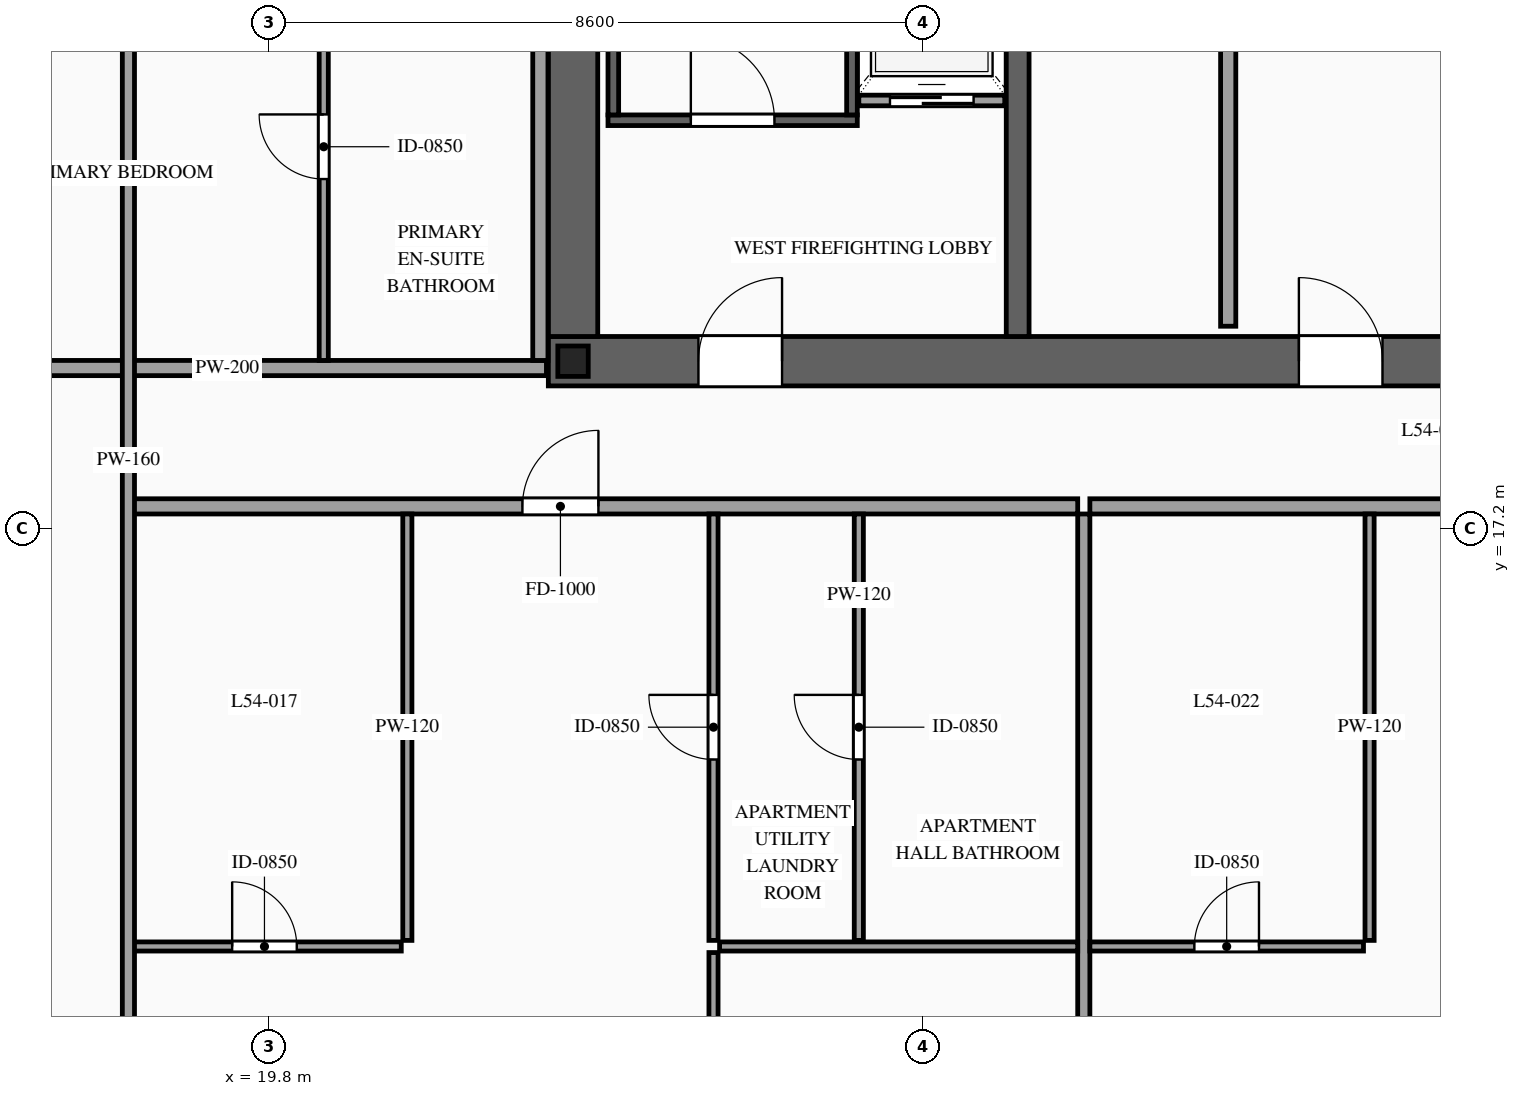
"""IFC4 building model, lengths in metres.
Left out: names, types, materials, properties, quantities, classifications, styles, units other than length and angle.
Written with IfcOpenShell. Run it as: python <this file> out.ifc"""

import sys

from ifc_helpers import new_model, si_unit, direction, frame, frame_2d, origin, origin_2d, place, context, subcontext, project, spatial, rectangle, i_section, extrude, source, transform, mapped, element, fill, save


model = new_model("IFC4")
c1 = context("Model", 3, precision=1e-05, world=origin(), true_north=direction((0.0, 1.0)))
c2 = subcontext(c1, "Body", "Model", "MODEL_VIEW")
j1 = project(units=[si_unit("LENGTHUNIT", "METRE"), si_unit("PLANEANGLEUNIT", "RADIAN")], contexts=[c1])
p1 = place(None, origin())
s1 = spatial("IfcSite", under=j1, at=p1, CompositionType="ELEMENT")
p2 = place(p1, origin())
s2 = spatial("IfcBuilding", under=s1, at=p2, CompositionType="ELEMENT")
p3 = place(p2, frame((0.0, 0.0, 205.5)))
s3 = spatial("IfcBuildingStorey", under=s2, at=p3, CompositionType="ELEMENT", Elevation=205.5)
p4 = place(p3, frame((23.475, 19.4, 0.0), z_axis=(0.0, 0.0, 1.0), x_axis=(1.0, 0.0, 0.0)))
e1 = element("IfcWall", 1, at=p4, inside=s3, PredefinedType="SHEAR", context=c2, shape_type="SweptSolid", body=[
    extrude(rectangle(XDim=27.05, YDim=0.65, at=frame_2d((13.525, 0.0))), origin(), (0.0, 0.0, 1.0), 3.5),
])
p5 = place(p4, frame((1.975, 0.0, 0.0)))
e2 = element("IfcOpeningElement", 2, at=p5, cuts=e1, PredefinedType="OPENING", context=c2, shape_type="SweptSolid", body=[
    extrude(rectangle(XDim=1.1, YDim=2.2, at=frame_2d((0.55, 1.1))), frame((0.0, 0.34, 0.0), z_axis=(0.0, -1.0, 0.0), x_axis=(1.0, 0.0, 0.0)), (0.0, 0.0, 1.0), 0.68),
])
p6 = place(p4, frame((9.875, 0.0, 0.0)))
e3 = element("IfcOpeningElement", 3, at=p6, cuts=e1, PredefinedType="OPENING", context=c2, shape_type="SweptSolid", body=[
    extrude(rectangle(XDim=1.1, YDim=2.2, at=frame_2d((0.55, 1.1))), frame((0.0, 0.34, 0.0), z_axis=(0.0, -1.0, 0.0), x_axis=(1.0, 0.0, 0.0)), (0.0, 0.0, 1.0), 0.68),
])
p7 = place(p4, frame((23.075, 0.0, 0.0)))
e4 = element("IfcOpeningElement", 4, at=p7, cuts=e1, PredefinedType="OPENING", context=c2, shape_type="SweptSolid", body=[
    extrude(rectangle(XDim=1.1, YDim=2.2, at=frame_2d((0.55, 1.1))), frame((0.0, 0.34, 0.0), z_axis=(0.0, -1.0, 0.0), x_axis=(1.0, 0.0, 0.0)), (0.0, 0.0, 1.0), 0.68),
])
p8 = place(p4, frame((19.695, 0.0, 0.0)))
e5 = element("IfcOpeningElement", 5, at=p8, cuts=e1, PredefinedType="OPENING", context=c2, shape_type="SweptSolid", body=[
    extrude(rectangle(XDim=0.9, YDim=2.15, at=frame_2d((0.45, 1.075))), frame((0.0, 0.34, 0.0), z_axis=(0.0, -1.0, 0.0), x_axis=(1.0, 0.0, 0.0)), (0.0, 0.0, 1.0), 0.68),
])
p9 = place(p4, frame((18.255, 0.0, 0.0)))
e6 = element("IfcOpeningElement", 6, at=p9, cuts=e1, PredefinedType="OPENING", context=c2, shape_type="SweptSolid", body=[
    extrude(rectangle(XDim=0.9, YDim=2.15, at=frame_2d((0.45, 1.075))), frame((0.0, 0.34, 0.0), z_axis=(0.0, -1.0, 0.0), x_axis=(1.0, 0.0, 0.0)), (0.0, 0.0, 1.0), 0.68),
])
m1 = source(origin(), c2, "Body", "SweptSolid", [
    extrude(rectangle(XDim=12.15, YDim=0.65, at=frame_2d((6.075, 0.0))), origin(), (0.0, 0.0, 1.0), 3.5),
])
p10 = place(p3, frame((23.8, 19.725, 0.0), z_axis=(0.0, 0.0, 1.0), x_axis=(0.0, 1.0, 0.0)))
e7 = element("IfcWall", 7, at=p10, inside=s3, PredefinedType="SHEAR", context=c2, shape_type="MappedRepresentation", body=[
    mapped(m1, transform((0.0, 0.0, 0.0), scale=1.0)),
])
m2 = source(origin(), c2, "Body", "SweptSolid", [
    extrude(rectangle(XDim=12.15, YDim=0.3, at=frame_2d((6.075, 0.0))), origin(), (0.0, 0.0, 1.0), 3.5),
])
p11 = place(p3, frame((29.65, 19.725, 0.0), z_axis=(0.0, 0.0, 1.0), x_axis=(0.0, 1.0, 0.0)))
e8 = element("IfcWall", 8, at=p11, inside=s3, PredefinedType="SOLIDWALL", context=c2, shape_type="MappedRepresentation", body=[
    mapped(m2, transform((0.0, 0.0, 0.0), scale=1.0)),
])
m3 = source(origin(), c2, "Body", "SweptSolid", [
    extrude(i_section(OverallWidth=0.4, OverallDepth=0.4, WebThickness=0.013, FlangeThickness=0.021, at=origin_2d()), origin(), (0.0, 0.0, 1.0), 3.5),
])
p12 = place(p3, frame((23.8, 19.4, 0.0), z_axis=(0.0, 0.0, 1.0), x_axis=(1.0, 0.0, 0.0)))
e9 = element("IfcColumn", 9, at=p12, inside=s3, PredefinedType="COLUMN", context=c2, shape_type="MappedRepresentation", body=[
    mapped(m3, transform((0.0, 0.0, 0.0), scale=1.0)),
])
p13 = place(p3, frame((27.56, 22.83, 0.0), z_axis=(0.0, 0.0, 1.0), x_axis=(1.0, 0.0, 0.0)))
e10 = element("IfcWall", 10, at=p13, inside=s3, PredefinedType="SOLIDWALL", context=c2, shape_type="SweptSolid", body=[
    extrude(rectangle(XDim=1.92, YDim=0.14, at=frame_2d((0.96, 0.0))), origin(), (0.0, 0.0, 1.0), 3.28),
])
p14 = place(p13, frame((0.41, 0.0, 0.0)))
e11 = element("IfcOpeningElement", 11, at=p14, cuts=e10, PredefinedType="OPENING", context=c2, shape_type="SweptSolid", body=[
    extrude(rectangle(XDim=1.1, YDim=2.2, at=frame_2d((0.55, 1.1))), frame((0.0, 0.085, 0.0), z_axis=(0.0, -1.0, 0.0), x_axis=(1.0, 0.0, 0.0)), (0.0, 0.0, 1.0), 0.17),
])
p15 = place(p3, frame((24.26, 22.57, 0.0), z_axis=(0.0, 0.0, 1.0), x_axis=(1.0, 0.0, 0.0)))
e12 = element("IfcWall", 12, at=p15, inside=s3, PredefinedType="SOLIDWALL", context=c2, shape_type="SweptSolid", body=[
    extrude(rectangle(XDim=3.28, YDim=0.14, at=frame_2d((1.64, 0.0))), origin(), (0.0, 0.0, 1.0), 3.28),
])
p16 = place(p15, frame((1.09, 0.0, 0.0)))
e13 = element("IfcOpeningElement", 13, at=p16, cuts=e12, PredefinedType="OPENING", context=c2, shape_type="SweptSolid", body=[
    extrude(rectangle(XDim=1.1, YDim=2.2, at=frame_2d((0.55, 1.1))), frame((0.0, 0.085, 0.0), z_axis=(0.0, -1.0, 0.0), x_axis=(1.0, 0.0, 0.0)), (0.0, 0.0, 1.0), 0.17),
])
m4 = source(origin(), c2, "Body", "SweptSolid", [
    extrude(rectangle(XDim=8.94, YDim=0.14, at=frame_2d((4.47, 0.0))), origin(), (0.0, 0.0, 1.0), 3.28),
])
for number, where, z_axis, x_axis in (
    (14, (24.33, 22.64, 0.0), (0.0, 0.0, 1.0), (0.0, 1.0, 0.0)),
    (15, (27.47, 22.64, 0.0), (0.0, 0.0, 1.0), (0.0, 1.0, 0.0)),
):
    element("IfcWall", number, at=place(p3, frame(where, z_axis=z_axis, x_axis=x_axis)), inside=s3, PredefinedType="SOLIDWALL", context=c2, shape_type="MappedRepresentation", body=[
        mapped(m4, transform((0.0, 0.0, 0.0), scale=1.0)),
    ])
p17 = place(p3, frame((32.42, 19.86, 0.0), z_axis=(0.0, 0.0, 1.0), x_axis=(0.0, 1.0, 0.0)))
e16 = element("IfcWall", 16, at=p17, inside=s3, PredefinedType="PARTITIONING", context=c2, shape_type="SweptSolid", body=[
    extrude(rectangle(XDim=11.88, YDim=0.2, at=frame_2d((5.94, 0.0))), origin(), (0.0, 0.0, 1.0), 3.28),
])
p18 = place(p17, frame((5.49, 0.0, 0.0)))
e17 = element("IfcOpeningElement", 17, at=p18, cuts=e16, PredefinedType="OPENING", context=c2, shape_type="SweptSolid", body=[
    extrude(rectangle(XDim=0.9, YDim=2.15, at=frame_2d((0.45, 1.075))), frame((0.0, 0.115, 0.0), z_axis=(0.0, -1.0, 0.0), x_axis=(1.0, 0.0, 0.0)), (0.0, 0.0, 1.0), 0.23),
])
p19 = place(p3, frame((17.94, 17.49, 0.0), z_axis=(0.0, 0.0, 1.0), x_axis=(1.0, 0.0, 0.0)))
e18 = element("IfcWall", 18, at=p19, inside=s3, PredefinedType="PARTITIONING", context=c2, shape_type="SweptSolid", body=[
    extrude(rectangle(XDim=12.5, YDim=0.2, at=frame_2d((6.25, 0.0))), origin(), (0.0, 0.0, 1.0), 3.28),
])
p20 = place(p19, frame((5.194, 0.0, 0.0)))
e19 = element("IfcOpeningElement", 19, at=p20, cuts=e18, PredefinedType="OPENING", context=c2, shape_type="SweptSolid", body=[
    extrude(rectangle(XDim=1.0, YDim=2.2, at=frame_2d((0.5, 1.1))), frame((0.0, 0.115, 0.0), z_axis=(0.0, -1.0, 0.0), x_axis=(1.0, 0.0, 0.0)), (0.0, 0.0, 1.0), 0.23),
])
m5 = source(origin(), c2, "Body", "SweptSolid", [
    extrude(rectangle(XDim=13.54, YDim=0.16, at=frame_2d((6.77, 0.0))), origin(), (0.0, 0.0, 1.0), 3.28),
])
p21 = place(p3, frame((30.52, 3.85, 0.0), z_axis=(0.0, 0.0, 1.0), x_axis=(0.0, 1.0, 0.0)))
e20 = element("IfcWall", 20, at=p21, inside=s3, PredefinedType="PARTITIONING", context=c2, shape_type="MappedRepresentation", body=[
    mapped(m5, transform((0.0, 0.0, 0.0), scale=1.0)),
])
p22 = place(p3, frame((17.94, 11.7, 0.0), z_axis=(0.0, 0.0, 1.0), x_axis=(1.0, 0.0, 0.0)))
e21 = element("IfcWall", 21, at=p22, inside=s3, PredefinedType="PARTITIONING", context=c2, shape_type="SweptSolid", body=[
    extrude(rectangle(XDim=3.6, YDim=0.12, at=frame_2d((1.8, 0.0))), origin(), (0.0, 0.0, 1.0), 3.28),
])
p23 = place(p22, frame((1.375, 0.0, 0.0)))
e22 = element("IfcOpeningElement", 22, at=p23, cuts=e21, PredefinedType="OPENING", context=c2, shape_type="SweptSolid", body=[
    extrude(rectangle(XDim=0.85, YDim=2.1, at=frame_2d((0.425, 1.05))), frame((0.0, 0.075, 0.0), z_axis=(0.0, -1.0, 0.0), x_axis=(1.0, 0.0, 0.0)), (0.0, 0.0, 1.0), 0.15),
])
m6 = source(origin(), c2, "Body", "SweptSolid", [
    extrude(rectangle(XDim=5.61, YDim=0.12, at=frame_2d((2.805, 0.0))), origin(), (0.0, 0.0, 1.0), 3.28),
])
p24 = place(p3, frame((21.62, 11.78, 0.0), z_axis=(0.0, 0.0, 1.0), x_axis=(0.0, 1.0, 0.0)))
e23 = element("IfcWall", 23, at=p24, inside=s3, PredefinedType="PARTITIONING", context=c2, shape_type="MappedRepresentation", body=[
    mapped(m6, transform((0.0, 0.0, 0.0), scale=1.0)),
])
p25 = place(p3, frame((27.56, 11.78, 0.0), z_axis=(0.0, 0.0, 1.0), x_axis=(0.0, 1.0, 0.0)))
e24 = element("IfcWall", 24, at=p25, inside=s3, PredefinedType="PARTITIONING", context=c2, shape_type="SweptSolid", body=[
    extrude(rectangle(XDim=5.61, YDim=0.12, at=frame_2d((2.805, 0.0))), origin(), (0.0, 0.0, 1.0), 3.28),
])
p26 = place(p25, frame((2.38, 0.0, 0.0)))
e25 = element("IfcOpeningElement", 25, at=p26, cuts=e24, PredefinedType="OPENING", context=c2, shape_type="SweptSolid", body=[
    extrude(rectangle(XDim=0.85, YDim=2.1, at=frame_2d((0.425, 1.05))), frame((0.0, 0.075, 0.0), z_axis=(0.0, -1.0, 0.0), x_axis=(1.0, 0.0, 0.0)), (0.0, 0.0, 1.0), 0.15),
])
m7 = source(origin(), c2, "Body", "SweptSolid", [
    extrude(rectangle(XDim=4.712, YDim=0.12, at=frame_2d((2.356, 0.0))), origin(), (0.0, 0.0, 1.0), 2.875),
])
p27 = place(p3, frame((25.728, 11.7, 0.0), z_axis=(0.0, 0.0, 1.0), x_axis=(1.0, 0.0, 0.0)))
e26 = element("IfcWall", 26, at=p27, inside=s3, PredefinedType="PARTITIONING", context=c2, shape_type="MappedRepresentation", body=[
    mapped(m7, transform((0.0, 0.0, 0.0), scale=1.0)),
])
p28 = place(p3, frame((25.648, 3.85, 0.0), z_axis=(0.0, 0.0, 1.0), x_axis=(0.0, 1.0, 0.0)))
e27 = element("IfcWall", 27, at=p28, inside=s3, PredefinedType="PARTITIONING", context=c2, shape_type="SweptSolid", body=[
    extrude(rectangle(XDim=7.77, YDim=0.12, at=frame_2d((3.885, 0.0))), origin(), (0.0, 0.0, 1.0), 3.28),
])
p29 = place(p28, frame((3.435, 0.0, 0.0)))
e28 = element("IfcOpeningElement", 28, at=p29, cuts=e27, PredefinedType="OPENING", context=c2, shape_type="SweptSolid", body=[
    extrude(rectangle(XDim=0.9, YDim=2.15, at=frame_2d((0.45, 1.075))), frame((0.0, 0.075, 0.0), z_axis=(0.0, -1.0, 0.0), x_axis=(1.0, 0.0, 0.0)), (0.0, 0.0, 1.0), 0.15),
])
p30 = place(p3, frame((25.648, 11.78, 0.0), z_axis=(0.0, 0.0, 1.0), x_axis=(0.0, 1.0, 0.0)))
e29 = element("IfcWall", 29, at=p30, inside=s3, PredefinedType="PARTITIONING", context=c2, shape_type="SweptSolid", body=[
    extrude(rectangle(XDim=5.61, YDim=0.12, at=frame_2d((2.805, 0.0))), origin(), (0.0, 0.0, 1.0), 3.28),
])
p31 = place(p30, frame((2.38, 0.0, 0.0)))
e30 = element("IfcOpeningElement", 30, at=p31, cuts=e29, PredefinedType="OPENING", context=c2, shape_type="SweptSolid", body=[
    extrude(rectangle(XDim=0.85, YDim=2.1, at=frame_2d((0.425, 1.05))), frame((0.0, 0.075, 0.0), z_axis=(0.0, -1.0, 0.0), x_axis=(1.0, 0.0, 0.0)), (0.0, 0.0, 1.0), 0.15),
])
p32 = place(p3, frame((30.6, 17.49, 0.0), z_axis=(0.0, 0.0, 1.0), x_axis=(1.0, 0.0, 0.0)))
e31 = element("IfcWall", 31, at=p32, inside=s3, PredefinedType="PARTITIONING", context=c2, shape_type="SweptSolid", body=[
    extrude(rectangle(XDim=12.8, YDim=0.2, at=frame_2d((6.4, 0.0))), origin(), (0.0, 0.0, 1.0), 3.28),
])
p33 = place(p32, frame((5.344, 0.0, 0.0)))
e32 = element("IfcOpeningElement", 32, at=p33, cuts=e31, PredefinedType="OPENING", context=c2, shape_type="SweptSolid", body=[
    extrude(rectangle(XDim=1.0, YDim=2.2, at=frame_2d((0.5, 1.1))), frame((0.0, 0.115, 0.0), z_axis=(0.0, -1.0, 0.0), x_axis=(1.0, 0.0, 0.0)), (0.0, 0.0, 1.0), 0.23),
])
p34 = place(p3, frame((30.6, 11.7, 0.0), z_axis=(0.0, 0.0, 1.0), x_axis=(1.0, 0.0, 0.0)))
e33 = element("IfcWall", 33, at=p34, inside=s3, PredefinedType="PARTITIONING", context=c2, shape_type="SweptSolid", body=[
    extrude(rectangle(XDim=3.6, YDim=0.12, at=frame_2d((1.8, 0.0))), origin(), (0.0, 0.0, 1.0), 2.875),
])
p35 = place(p34, frame((1.375, 0.0, 0.0)))
e34 = element("IfcOpeningElement", 34, at=p35, cuts=e33, PredefinedType="OPENING", context=c2, shape_type="SweptSolid", body=[
    extrude(rectangle(XDim=0.85, YDim=2.1, at=frame_2d((0.425, 1.05))), frame((0.0, 0.075, 0.0), z_axis=(0.0, -1.0, 0.0), x_axis=(1.0, 0.0, 0.0)), (0.0, 0.0, 1.0), 0.15),
])
p36 = place(p3, frame((34.28, 11.78, 0.0), z_axis=(0.0, 0.0, 1.0), x_axis=(0.0, 1.0, 0.0)))
e35 = element("IfcWall", 35, at=p36, inside=s3, PredefinedType="PARTITIONING", context=c2, shape_type="MappedRepresentation", body=[
    mapped(m6, transform((0.0, 0.0, 0.0), scale=1.0)),
])
m8 = source(origin(), c2, "Body", "SweptSolid", [
    extrude(rectangle(XDim=8.4, YDim=0.2, at=frame_2d((4.2, 0.0))), origin(), (0.0, 0.0, 1.0), 2.775),
])
p37 = place(p3, frame((15.05, 19.31, 0.0), z_axis=(0.0, 0.0, 1.0), x_axis=(1.0, 0.0, 0.0)))
e36 = element("IfcWall", 36, at=p37, inside=s3, PredefinedType="PARTITIONING", context=c2, shape_type="MappedRepresentation", body=[
    mapped(m8, transform((0.0, 0.0, 0.0), scale=1.0)),
])
m9 = source(origin(), c2, "Body", "SweptSolid", [
    extrude(rectangle(XDim=12.78, YDim=0.2, at=frame_2d((6.39, 0.0))), origin(), (0.0, 0.0, 1.0), 3.28),
])
p38 = place(p3, frame((23.37, 19.41, 0.0), z_axis=(0.0, 0.0, 1.0), x_axis=(0.0, 1.0, 0.0)))
e37 = element("IfcWall", 37, at=p38, inside=s3, PredefinedType="PARTITIONING", context=c2, shape_type="MappedRepresentation", body=[
    mapped(m9, transform((0.0, 0.0, 0.0), scale=1.0)),
])
p39 = place(p3, frame((20.52, 19.41, 0.0), z_axis=(0.0, 0.0, 1.0), x_axis=(0.0, 1.0, 0.0)))
e38 = element("IfcWall", 38, at=p39, inside=s3, PredefinedType="PARTITIONING", context=c2, shape_type="SweptSolid", body=[
    extrude(rectangle(XDim=5.623, YDim=0.12, at=frame_2d((2.812, 0.0))), origin(), (0.0, 0.0, 1.0), 3.28),
])
p40 = place(p39, frame((2.386, 0.0, 0.0)))
e39 = element("IfcOpeningElement", 39, at=p40, cuts=e38, PredefinedType="OPENING", context=c2, shape_type="SweptSolid", body=[
    extrude(rectangle(XDim=0.85, YDim=2.1, at=frame_2d((0.425, 1.05))), frame((0.0, 0.075, 0.0), z_axis=(0.0, -1.0, 0.0), x_axis=(1.0, 0.0, 0.0)), (0.0, 0.0, 1.0), 0.15),
])
m10 = source(origin(), c2, "Body", "SweptSolid", [
    extrude(rectangle(XDim=28.19, YDim=0.16, at=frame_2d((14.095, 0.0))), origin(), (0.0, 0.0, 1.0), 3.28),
])
p41 = place(p3, frame((17.95, 4.0, 0.0), z_axis=(0.0, 0.0, 1.0), x_axis=(0.0, 1.0, 0.0)))
e40 = element("IfcWall", 40, at=p41, inside=s3, PredefinedType="PARTITIONING", context=c2, shape_type="MappedRepresentation", body=[
    mapped(m10, transform((0.0, 0.0, 0.0), scale=1.0)),
])
m11 = source(origin(), c2, "Body", "SweptSolid", [
    extrude(rectangle(XDim=1.1, YDim=2.2, at=frame_2d((0.55, 1.1))), frame((0.0, 0.025, 0.0), z_axis=(0.0, -1.0, 0.0), x_axis=(1.0, 0.0, 0.0)), (0.0, 0.0, 1.0), 0.05),
])
p42 = place(p14, origin())
e41 = element("IfcDoor", 41, at=p42, inside=s3, OperationType="SLIDING_TO_LEFT", PredefinedType="DOOR", context=c2, shape_type="MappedRepresentation", body=[
    mapped(m11, transform((0.0, 0.0, 0.0), scale=1.0)),
])
fill(e11, e41)
m12 = source(origin(), c2, "Body", "SweptSolid", [
    extrude(rectangle(XDim=1.1, YDim=2.2, at=frame_2d((0.55, 1.1))), frame((0.0, 0.025, 0.0), z_axis=(0.0, -1.0, 0.0), x_axis=(1.0, 0.0, 0.0)), (0.0, 0.0, 1.0), 0.05),
])
p43 = place(p16, origin())
e42 = element("IfcDoor", 42, at=p43, inside=s3, OperationType="SINGLE_SWING_LEFT", PredefinedType="DOOR", context=c2, shape_type="MappedRepresentation", body=[
    mapped(m12, transform((0.0, 0.0, 0.0), scale=1.0)),
])
fill(e13, e42)
p44 = place(p5, origin())
e43 = element("IfcDoor", 43, at=p44, inside=s3, OperationType="SINGLE_SWING_RIGHT", PredefinedType="DOOR", context=c2, shape_type="MappedRepresentation", body=[
    mapped(m12, transform((0.0, 0.0, 0.0), scale=1.0)),
])
fill(e2, e43)
p45 = place(p6, origin())
e44 = element("IfcDoor", 44, at=p45, inside=s3, OperationType="SINGLE_SWING_LEFT", PredefinedType="DOOR", context=c2, shape_type="MappedRepresentation", body=[
    mapped(m12, transform((0.0, 0.0, 0.0), scale=1.0)),
])
fill(e3, e44)
m13 = source(origin(), c2, "Body", "SweptSolid", [
    extrude(rectangle(XDim=1.0, YDim=2.2, at=frame_2d((0.5, 1.1))), frame((0.0, 0.025, 0.0), z_axis=(0.0, -1.0, 0.0), x_axis=(1.0, 0.0, 0.0)), (0.0, 0.0, 1.0), 0.05),
])
p46 = place(p20, origin())
e45 = element("IfcDoor", 45, at=p46, inside=s3, OperationType="SINGLE_SWING_RIGHT", PredefinedType="DOOR", context=c2, shape_type="MappedRepresentation", body=[
    mapped(m13, transform((0.0, 0.0, 0.0), scale=1.0)),
])
fill(e19, e45)
m14 = source(origin(), c2, "Body", "SweptSolid", [
    extrude(rectangle(XDim=0.85, YDim=2.1, at=frame_2d((0.425, 1.05))), frame((0.0, 0.025, 0.0), z_axis=(0.0, -1.0, 0.0), x_axis=(1.0, 0.0, 0.0)), (0.0, 0.0, 1.0), 0.05),
])
p47 = place(p23, origin())
e46 = element("IfcDoor", 46, at=p47, inside=s3, OperationType="SINGLE_SWING_LEFT", PredefinedType="DOOR", context=c2, shape_type="MappedRepresentation", body=[
    mapped(m14, transform((0.0, 0.0, 0.0), scale=1.0)),
])
fill(e22, e46)
p48 = place(p26, origin())
e47 = element("IfcDoor", 47, at=p48, inside=s3, OperationType="SINGLE_SWING_RIGHT", PredefinedType="DOOR", context=c2, shape_type="MappedRepresentation", body=[
    mapped(m14, transform((0.0, 0.0, 0.0), scale=1.0)),
])
fill(e25, e47)
p49 = place(p31, origin())
e48 = element("IfcDoor", 48, at=p49, inside=s3, OperationType="SINGLE_SWING_RIGHT", PredefinedType="DOOR", context=c2, shape_type="MappedRepresentation", body=[
    mapped(m14, transform((0.0, 0.0, 0.0), scale=1.0)),
])
fill(e30, e48)
p50 = place(p35, origin())
e49 = element("IfcDoor", 49, at=p50, inside=s3, OperationType="SINGLE_SWING_RIGHT", PredefinedType="DOOR", context=c2, shape_type="MappedRepresentation", body=[
    mapped(m14, transform((0.0, 0.0, 0.0), scale=1.0)),
])
fill(e34, e49)
p51 = place(p40, origin())
e50 = element("IfcDoor", 50, at=p51, inside=s3, OperationType="SINGLE_SWING_RIGHT", PredefinedType="DOOR", context=c2, shape_type="MappedRepresentation", body=[
    mapped(m14, transform((0.0, 0.0, 0.0), scale=1.0)),
])
fill(e39, e50)
save(model, sys.argv[1])
